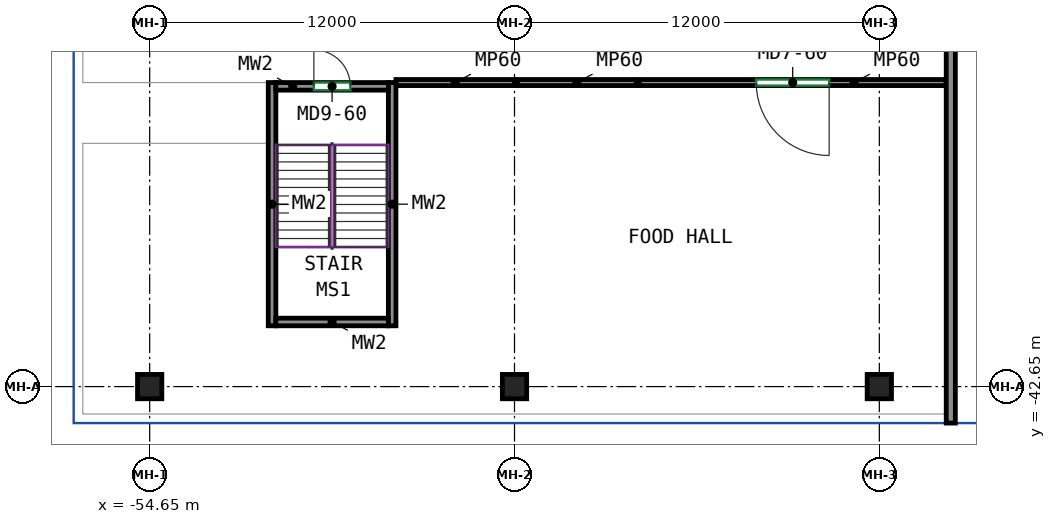
"""IFC4 building model, lengths in metres.
Left out: names, types, materials, properties, quantities, classifications, styles, units other than length and angle.
Written with IfcOpenShell. Run it as: python <this file> out.ifc"""

import sys

from ifc_helpers import new_model, si_unit, direction, frame, frame_2d, origin, origin_2d, place, context, subcontext, project, spatial, rectangle, extrude, source, transform, mapped, element, fill, save


model = new_model("IFC4")
c1 = context("Model", 3, precision=1e-05, world=origin(), true_north=direction((0.0, 1.0)))
c2 = subcontext(c1, "Body", "Model", "MODEL_VIEW")
j1 = project(units=[si_unit("LENGTHUNIT", "METRE"), si_unit("PLANEANGLEUNIT", "RADIAN")], contexts=[c1])
p1 = place(None, origin())
s1 = spatial("IfcSite", under=j1, at=p1, CompositionType="ELEMENT")
p2 = place(p1, origin())
s2 = spatial("IfcBuilding", under=s1, at=p2, CompositionType="ELEMENT")
p3 = place(p2, frame((0.0, 0.0, 9.0)))
s3 = spatial("IfcBuildingStorey", under=s2, at=p3, CompositionType="ELEMENT", Elevation=9.0)
m1 = source(origin(), c2, "Body", "SweptSolid", [
    extrude(rectangle(XDim=0.8, YDim=0.8, at=origin_2d()), origin(), (0.0, 0.0, 1.0), 4.1),
])
for number, where, z_axis, x_axis in (
    (1, (-54.65, -42.65, 0.0), (0.0, 0.0, 1.0), (1.0, 0.0, 0.0)),
    (2, (-42.65, -42.65, 0.0), (0.0, 0.0, 1.0), (1.0, 0.0, 0.0)),
    (3, (-30.65, -42.65, 0.0), (0.0, 0.0, 1.0), (1.0, 0.0, 0.0)),
):
    element("IfcColumn", number, at=place(p3, frame(where, z_axis=z_axis, x_axis=x_axis)), inside=s3, PredefinedType="COLUMN", context=c2, shape_type="MappedRepresentation", body=[
        mapped(m1, transform((0.0, 0.0, 0.0))),
    ])
m2 = source(origin(), c2, "Body", "SweptSolid", [
    extrude(rectangle(XDim=8.0, YDim=0.25, at=frame_2d((4.0, 0.0))), origin(), (0.0, 0.0, 1.0), 4.1),
])
for number, where, z_axis, x_axis in (
    (4, (-50.625, -40.65, 0.0), (0.0, 0.0, 1.0), (0.0, 1.0, 0.0)),
    (5, (-46.675, -40.65, 0.0), (0.0, 0.0, 1.0), (0.0, 1.0, 0.0)),
):
    element("IfcWall", number, at=place(p3, frame(where, z_axis=z_axis, x_axis=x_axis)), inside=s3, PredefinedType="SHEAR", context=c2, shape_type="MappedRepresentation", body=[
        mapped(m2, transform((0.0, 0.0, 0.0))),
    ])
m3 = source(origin(), c2, "Body", "SweptSolid", [
    extrude(rectangle(XDim=3.7, YDim=0.25, at=frame_2d((1.85, 0.0))), origin(), (0.0, 0.0, 1.0), 4.1),
])
p4 = place(p3, frame((-50.5, -40.525, 0.0), z_axis=(0.0, 0.0, 1.0), x_axis=(1.0, 0.0, 0.0)))
e6 = element("IfcWall", 6, at=p4, inside=s3, PredefinedType="SHEAR", context=c2, shape_type="MappedRepresentation", body=[
    mapped(m3, transform((0.0, 0.0, 0.0))),
])
p5 = place(p3, frame((-50.5, -32.775, 0.0), z_axis=(0.0, 0.0, 1.0), x_axis=(1.0, 0.0, 0.0)))
e7 = element("IfcWall", 7, at=p5, inside=s3, PredefinedType="SHEAR", context=c2, shape_type="MappedRepresentation", body=[
    mapped(m3, transform((0.0, 0.0, 0.0))),
])
p6 = place(p5, frame((1.25, 0.0, 0.0)))
e8 = element("IfcOpeningElement", 8, at=p6, cuts=e7, PredefinedType="OPENING", context=c2, shape_type="SweptSolid", body=[
    extrude(rectangle(XDim=1.2, YDim=2.1, at=frame_2d((0.6, 1.05))), frame((0.0, 0.135, 0.0), z_axis=(0.0, -1.0, 0.0), x_axis=(1.0, 0.0, 0.0)), (0.0, 0.0, 1.0), 0.27),
])
m4 = source(origin(), c2, "Body", "SweptSolid", [
    extrude(rectangle(XDim=100.7, YDim=0.3, at=frame_2d((50.35, 0.0))), origin(), (0.0, 0.0, 1.0), 4.1),
])
p7 = place(p3, frame((-57.0, -43.55, 0.0), z_axis=(0.0, 0.0, 1.0), x_axis=(0.0, 1.0, 0.0)))
e9 = element("IfcWall", 9, at=p7, inside=s3, PredefinedType="SOLIDWALL", context=c2, shape_type="MappedRepresentation", body=[
    mapped(m4, transform((0.0, 0.0, 0.0))),
])
p8 = place(p7, frame((3.15, 0.0, 0.9)))
e10 = element("IfcOpeningElement", 10, at=p8, cuts=e9, PredefinedType="OPENING", context=c2, shape_type="SweptSolid", body=[
    extrude(rectangle(XDim=2.4, YDim=1.8, at=frame_2d((1.2, 0.9))), frame((0.0, 0.16, 0.0), z_axis=(0.0, -1.0, 0.0), x_axis=(1.0, 0.0, 0.0)), (0.0, 0.0, 1.0), 0.32),
])
p9 = place(p7, frame((7.15, 0.0, 0.9)))
e11 = element("IfcOpeningElement", 11, at=p9, cuts=e9, PredefinedType="OPENING", context=c2, shape_type="SweptSolid", body=[
    extrude(rectangle(XDim=2.4, YDim=1.8, at=frame_2d((1.2, 0.9))), frame((0.0, 0.16, 0.0), z_axis=(0.0, -1.0, 0.0), x_axis=(1.0, 0.0, 0.0)), (0.0, 0.0, 1.0), 0.32),
])
p10 = place(p7, frame((11.15, 0.0, 0.9)))
e12 = element("IfcOpeningElement", 12, at=p10, cuts=e9, PredefinedType="OPENING", context=c2, shape_type="SweptSolid", body=[
    extrude(rectangle(XDim=2.4, YDim=1.8, at=frame_2d((1.2, 0.9))), frame((0.0, 0.16, 0.0), z_axis=(0.0, -1.0, 0.0), x_axis=(1.0, 0.0, 0.0)), (0.0, 0.0, 1.0), 0.32),
])
p11 = place(p7, frame((19.15, 0.0, 0.9)))
e13 = element("IfcOpeningElement", 13, at=p11, cuts=e9, PredefinedType="OPENING", context=c2, shape_type="SweptSolid", body=[
    extrude(rectangle(XDim=2.4, YDim=1.8, at=frame_2d((1.2, 0.9))), frame((0.0, 0.16, 0.0), z_axis=(0.0, -1.0, 0.0), x_axis=(1.0, 0.0, 0.0)), (0.0, 0.0, 1.0), 0.32),
])
p12 = place(p7, frame((23.15, 0.0, 0.9)))
e14 = element("IfcOpeningElement", 14, at=p12, cuts=e9, PredefinedType="OPENING", context=c2, shape_type="SweptSolid", body=[
    extrude(rectangle(XDim=2.4, YDim=1.8, at=frame_2d((1.2, 0.9))), frame((0.0, 0.16, 0.0), z_axis=(0.0, -1.0, 0.0), x_axis=(1.0, 0.0, 0.0)), (0.0, 0.0, 1.0), 0.32),
])
p13 = place(p7, frame((27.15, 0.0, 0.9)))
e15 = element("IfcOpeningElement", 15, at=p13, cuts=e9, PredefinedType="OPENING", context=c2, shape_type="SweptSolid", body=[
    extrude(rectangle(XDim=2.4, YDim=1.8, at=frame_2d((1.2, 0.9))), frame((0.0, 0.16, 0.0), z_axis=(0.0, -1.0, 0.0), x_axis=(1.0, 0.0, 0.0)), (0.0, 0.0, 1.0), 0.32),
])
p14 = place(p7, frame((31.15, 0.0, 0.9)))
e16 = element("IfcOpeningElement", 16, at=p14, cuts=e9, PredefinedType="OPENING", context=c2, shape_type="SweptSolid", body=[
    extrude(rectangle(XDim=2.4, YDim=1.8, at=frame_2d((1.2, 0.9))), frame((0.0, 0.16, 0.0), z_axis=(0.0, -1.0, 0.0), x_axis=(1.0, 0.0, 0.0)), (0.0, 0.0, 1.0), 0.32),
])
p15 = place(p7, frame((39.15, 0.0, 0.9)))
e17 = element("IfcOpeningElement", 17, at=p15, cuts=e9, PredefinedType="OPENING", context=c2, shape_type="SweptSolid", body=[
    extrude(rectangle(XDim=2.4, YDim=1.8, at=frame_2d((1.2, 0.9))), frame((0.0, 0.16, 0.0), z_axis=(0.0, -1.0, 0.0), x_axis=(1.0, 0.0, 0.0)), (0.0, 0.0, 1.0), 0.32),
])
p16 = place(p7, frame((43.15, 0.0, 0.9)))
e18 = element("IfcOpeningElement", 18, at=p16, cuts=e9, PredefinedType="OPENING", context=c2, shape_type="SweptSolid", body=[
    extrude(rectangle(XDim=2.4, YDim=1.8, at=frame_2d((1.2, 0.9))), frame((0.0, 0.16, 0.0), z_axis=(0.0, -1.0, 0.0), x_axis=(1.0, 0.0, 0.0)), (0.0, 0.0, 1.0), 0.32),
])
p17 = place(p7, frame((51.15, 0.0, 0.9)))
e19 = element("IfcOpeningElement", 19, at=p17, cuts=e9, PredefinedType="OPENING", context=c2, shape_type="SweptSolid", body=[
    extrude(rectangle(XDim=2.4, YDim=1.8, at=frame_2d((1.2, 0.9))), frame((0.0, 0.16, 0.0), z_axis=(0.0, -1.0, 0.0), x_axis=(1.0, 0.0, 0.0)), (0.0, 0.0, 1.0), 0.32),
])
p18 = place(p7, frame((55.15, 0.0, 0.9)))
e20 = element("IfcOpeningElement", 20, at=p18, cuts=e9, PredefinedType="OPENING", context=c2, shape_type="SweptSolid", body=[
    extrude(rectangle(XDim=2.4, YDim=1.8, at=frame_2d((1.2, 0.9))), frame((0.0, 0.16, 0.0), z_axis=(0.0, -1.0, 0.0), x_axis=(1.0, 0.0, 0.0)), (0.0, 0.0, 1.0), 0.32),
])
p19 = place(p7, frame((59.15, 0.0, 0.9)))
e21 = element("IfcOpeningElement", 21, at=p19, cuts=e9, PredefinedType="OPENING", context=c2, shape_type="SweptSolid", body=[
    extrude(rectangle(XDim=2.4, YDim=1.8, at=frame_2d((1.2, 0.9))), frame((0.0, 0.16, 0.0), z_axis=(0.0, -1.0, 0.0), x_axis=(1.0, 0.0, 0.0)), (0.0, 0.0, 1.0), 0.32),
])
p20 = place(p7, frame((63.15, 0.0, 0.9)))
e22 = element("IfcOpeningElement", 22, at=p20, cuts=e9, PredefinedType="OPENING", context=c2, shape_type="SweptSolid", body=[
    extrude(rectangle(XDim=2.4, YDim=1.8, at=frame_2d((1.2, 0.9))), frame((0.0, 0.16, 0.0), z_axis=(0.0, -1.0, 0.0), x_axis=(1.0, 0.0, 0.0)), (0.0, 0.0, 1.0), 0.32),
])
p21 = place(p7, frame((67.15, 0.0, 0.9)))
e23 = element("IfcOpeningElement", 23, at=p21, cuts=e9, PredefinedType="OPENING", context=c2, shape_type="SweptSolid", body=[
    extrude(rectangle(XDim=2.4, YDim=1.8, at=frame_2d((1.2, 0.9))), frame((0.0, 0.16, 0.0), z_axis=(0.0, -1.0, 0.0), x_axis=(1.0, 0.0, 0.0)), (0.0, 0.0, 1.0), 0.32),
])
p22 = place(p7, frame((75.15, 0.0, 0.9)))
e24 = element("IfcOpeningElement", 24, at=p22, cuts=e9, PredefinedType="OPENING", context=c2, shape_type="SweptSolid", body=[
    extrude(rectangle(XDim=2.4, YDim=1.8, at=frame_2d((1.2, 0.9))), frame((0.0, 0.16, 0.0), z_axis=(0.0, -1.0, 0.0), x_axis=(1.0, 0.0, 0.0)), (0.0, 0.0, 1.0), 0.32),
])
p23 = place(p7, frame((79.15, 0.0, 0.9)))
e25 = element("IfcOpeningElement", 25, at=p23, cuts=e9, PredefinedType="OPENING", context=c2, shape_type="SweptSolid", body=[
    extrude(rectangle(XDim=2.4, YDim=1.8, at=frame_2d((1.2, 0.9))), frame((0.0, 0.16, 0.0), z_axis=(0.0, -1.0, 0.0), x_axis=(1.0, 0.0, 0.0)), (0.0, 0.0, 1.0), 0.32),
])
p24 = place(p7, frame((83.15, 0.0, 0.9)))
e26 = element("IfcOpeningElement", 26, at=p24, cuts=e9, PredefinedType="OPENING", context=c2, shape_type="SweptSolid", body=[
    extrude(rectangle(XDim=2.4, YDim=1.8, at=frame_2d((1.2, 0.9))), frame((0.0, 0.16, 0.0), z_axis=(0.0, -1.0, 0.0), x_axis=(1.0, 0.0, 0.0)), (0.0, 0.0, 1.0), 0.32),
])
p25 = place(p7, frame((87.15, 0.0, 0.9)))
e27 = element("IfcOpeningElement", 27, at=p25, cuts=e9, PredefinedType="OPENING", context=c2, shape_type="SweptSolid", body=[
    extrude(rectangle(XDim=2.4, YDim=1.8, at=frame_2d((1.2, 0.9))), frame((0.0, 0.16, 0.0), z_axis=(0.0, -1.0, 0.0), x_axis=(1.0, 0.0, 0.0)), (0.0, 0.0, 1.0), 0.32),
])
p26 = place(p7, frame((91.15, 0.0, 0.9)))
e28 = element("IfcOpeningElement", 28, at=p26, cuts=e9, PredefinedType="OPENING", context=c2, shape_type="SweptSolid", body=[
    extrude(rectangle(XDim=2.4, YDim=1.8, at=frame_2d((1.2, 0.9))), frame((0.0, 0.16, 0.0), z_axis=(0.0, -1.0, 0.0), x_axis=(1.0, 0.0, 0.0)), (0.0, 0.0, 1.0), 0.32),
])
p27 = place(p7, frame((95.15, 0.0, 0.9)))
e29 = element("IfcOpeningElement", 29, at=p27, cuts=e9, PredefinedType="OPENING", context=c2, shape_type="SweptSolid", body=[
    extrude(rectangle(XDim=2.4, YDim=1.8, at=frame_2d((1.2, 0.9))), frame((0.0, 0.16, 0.0), z_axis=(0.0, -1.0, 0.0), x_axis=(1.0, 0.0, 0.0)), (0.0, 0.0, 1.0), 0.32),
])
m5 = source(origin(), c2, "Body", "SweptSolid", [
    extrude(rectangle(XDim=72.0, YDim=0.3, at=frame_2d((36.0, 0.0))), origin(), (0.0, 0.0, 1.0), 4.1),
])
p28 = place(p3, frame((-28.3, 28.15, 0.0), z_axis=(0.0, 0.0, 1.0), x_axis=(0.0, -1.0, 0.0)))
e30 = element("IfcWall", 30, at=p28, inside=s3, PredefinedType="SOLIDWALL", context=c2, shape_type="MappedRepresentation", body=[
    mapped(m5, transform((0.0, 0.0, 0.0))),
])
m6 = source(origin(), c2, "Body", "SweptSolid", [
    extrude(rectangle(XDim=28.7, YDim=0.3, at=frame_2d((14.35, 0.0))), origin(), (0.0, 0.0, 1.0), 4.1),
])
p29 = place(p3, frame((-28.45, -43.7, 0.0), z_axis=(0.0, 0.0, 1.0), x_axis=(-1.0, 0.0, 0.0)))
e31 = element("IfcWall", 31, at=p29, inside=s3, PredefinedType="SOLIDWALL", context=c2, shape_type="MappedRepresentation", body=[
    mapped(m6, transform((0.0, 0.0, 0.0))),
])
p30 = place(p29, frame((3.15, 0.0, 0.9)))
e32 = element("IfcOpeningElement", 32, at=p30, cuts=e31, PredefinedType="OPENING", context=c2, shape_type="SweptSolid", body=[
    extrude(rectangle(XDim=2.4, YDim=1.8, at=frame_2d((1.2, 0.9))), frame((0.0, 0.16, 0.0), z_axis=(0.0, -1.0, 0.0), x_axis=(1.0, 0.0, 0.0)), (0.0, 0.0, 1.0), 0.32),
])
p31 = place(p29, frame((7.15, 0.0, 0.9)))
e33 = element("IfcOpeningElement", 33, at=p31, cuts=e31, PredefinedType="OPENING", context=c2, shape_type="SweptSolid", body=[
    extrude(rectangle(XDim=2.4, YDim=1.8, at=frame_2d((1.2, 0.9))), frame((0.0, 0.16, 0.0), z_axis=(0.0, -1.0, 0.0), x_axis=(1.0, 0.0, 0.0)), (0.0, 0.0, 1.0), 0.32),
])
p32 = place(p29, frame((11.15, 0.0, 0.9)))
e34 = element("IfcOpeningElement", 34, at=p32, cuts=e31, PredefinedType="OPENING", context=c2, shape_type="SweptSolid", body=[
    extrude(rectangle(XDim=2.4, YDim=1.8, at=frame_2d((1.2, 0.9))), frame((0.0, 0.16, 0.0), z_axis=(0.0, -1.0, 0.0), x_axis=(1.0, 0.0, 0.0)), (0.0, 0.0, 1.0), 0.32),
])
p33 = place(p29, frame((15.15, 0.0, 0.9)))
e35 = element("IfcOpeningElement", 35, at=p33, cuts=e31, PredefinedType="OPENING", context=c2, shape_type="SweptSolid", body=[
    extrude(rectangle(XDim=2.4, YDim=1.8, at=frame_2d((1.2, 0.9))), frame((0.0, 0.16, 0.0), z_axis=(0.0, -1.0, 0.0), x_axis=(1.0, 0.0, 0.0)), (0.0, 0.0, 1.0), 0.32),
])
p34 = place(p29, frame((19.15, 0.0, 0.9)))
e36 = element("IfcOpeningElement", 36, at=p34, cuts=e31, PredefinedType="OPENING", context=c2, shape_type="SweptSolid", body=[
    extrude(rectangle(XDim=2.4, YDim=1.8, at=frame_2d((1.2, 0.9))), frame((0.0, 0.16, 0.0), z_axis=(0.0, -1.0, 0.0), x_axis=(1.0, 0.0, 0.0)), (0.0, 0.0, 1.0), 0.32),
])
p35 = place(p29, frame((23.15, 0.0, 0.9)))
e37 = element("IfcOpeningElement", 37, at=p35, cuts=e31, PredefinedType="OPENING", context=c2, shape_type="SweptSolid", body=[
    extrude(rectangle(XDim=2.4, YDim=1.8, at=frame_2d((1.2, 0.9))), frame((0.0, 0.16, 0.0), z_axis=(0.0, -1.0, 0.0), x_axis=(1.0, 0.0, 0.0)), (0.0, 0.0, 1.0), 0.32),
])
m7 = source(origin(), c2, "Body", "SweptSolid", [
    extrude(rectangle(XDim=3.9, YDim=0.2, at=frame_2d((1.95, 0.0))), origin(), (0.0, 0.0, 1.0), 3.2),
])
for number, where, z_axis, x_axis in (
    (38, (-42.65, -32.65, 0.0), (0.0, 0.0, 1.0), (-1.0, 0.0, 0.0)),
    (39, (-38.65, -32.65, 0.0), (0.0, 0.0, 1.0), (-1.0, 0.0, 0.0)),
):
    element("IfcWall", number, at=place(p3, frame(where, z_axis=z_axis, x_axis=x_axis)), inside=s3, PredefinedType="PARTITIONING", context=c2, shape_type="MappedRepresentation", body=[
        mapped(m7, transform((0.0, 0.0, 0.0))),
    ])
m8 = source(origin(), c2, "Body", "SweptSolid", [
    extrude(rectangle(XDim=10.1, YDim=0.2, at=frame_2d((5.05, 0.0))), origin(), (0.0, 0.0, 1.0), 3.2),
])
p36 = place(p3, frame((-28.45, -32.65, 0.0), z_axis=(0.0, 0.0, 1.0), x_axis=(-1.0, 0.0, 0.0)))
e40 = element("IfcWall", 40, at=p36, inside=s3, PredefinedType="PARTITIONING", context=c2, shape_type="MappedRepresentation", body=[
    mapped(m8, transform((0.0, 0.0, 0.0))),
])
p37 = place(p36, frame((3.85, 0.0, 0.0)))
e41 = element("IfcOpeningElement", 41, at=p37, cuts=e40, PredefinedType="OPENING", context=c2, shape_type="SweptSolid", body=[
    extrude(rectangle(XDim=2.4, YDim=2.4, at=frame_2d((1.2, 1.2))), frame((0.0, 0.11, 0.0), z_axis=(0.0, -1.0, 0.0), x_axis=(1.0, 0.0, 0.0)), (0.0, 0.0, 1.0), 0.22),
])
p38 = place(p8, origin())
e42 = element("IfcWindow", 42, at=p38, inside=s3, PartitioningType="SINGLE_PANEL", PredefinedType="WINDOW", context=c2, shape_type="SweptSolid", body=[
    extrude(rectangle(XDim=2.4, YDim=1.8, at=frame_2d((1.2, 0.9))), frame((0.0, 0.03, 0.0), z_axis=(0.0, -1.0, 0.0), x_axis=(1.0, 0.0, 0.0)), (0.0, 0.0, 1.0), 0.06),
])
fill(e10, e42)
p39 = place(p9, origin())
e43 = element("IfcWindow", 43, at=p39, inside=s3, PartitioningType="SINGLE_PANEL", PredefinedType="WINDOW", context=c2, shape_type="SweptSolid", body=[
    extrude(rectangle(XDim=2.4, YDim=1.8, at=frame_2d((1.2, 0.9))), frame((0.0, 0.03, 0.0), z_axis=(0.0, -1.0, 0.0), x_axis=(1.0, 0.0, 0.0)), (0.0, 0.0, 1.0), 0.06),
])
fill(e11, e43)
p40 = place(p10, origin())
e44 = element("IfcWindow", 44, at=p40, inside=s3, PartitioningType="SINGLE_PANEL", PredefinedType="WINDOW", context=c2, shape_type="SweptSolid", body=[
    extrude(rectangle(XDim=2.4, YDim=1.8, at=frame_2d((1.2, 0.9))), frame((0.0, 0.03, 0.0), z_axis=(0.0, -1.0, 0.0), x_axis=(1.0, 0.0, 0.0)), (0.0, 0.0, 1.0), 0.06),
])
fill(e12, e44)
p41 = place(p30, origin())
e45 = element("IfcWindow", 45, at=p41, inside=s3, PartitioningType="SINGLE_PANEL", PredefinedType="WINDOW", context=c2, shape_type="SweptSolid", body=[
    extrude(rectangle(XDim=2.4, YDim=1.8, at=frame_2d((1.2, 0.9))), frame((0.0, 0.03, 0.0), z_axis=(0.0, -1.0, 0.0), x_axis=(1.0, 0.0, 0.0)), (0.0, 0.0, 1.0), 0.06),
])
fill(e32, e45)
p42 = place(p31, origin())
e46 = element("IfcWindow", 46, at=p42, inside=s3, PartitioningType="SINGLE_PANEL", PredefinedType="WINDOW", context=c2, shape_type="SweptSolid", body=[
    extrude(rectangle(XDim=2.4, YDim=1.8, at=frame_2d((1.2, 0.9))), frame((0.0, 0.03, 0.0), z_axis=(0.0, -1.0, 0.0), x_axis=(1.0, 0.0, 0.0)), (0.0, 0.0, 1.0), 0.06),
])
fill(e33, e46)
p43 = place(p32, origin())
e47 = element("IfcWindow", 47, at=p43, inside=s3, PartitioningType="SINGLE_PANEL", PredefinedType="WINDOW", context=c2, shape_type="SweptSolid", body=[
    extrude(rectangle(XDim=2.4, YDim=1.8, at=frame_2d((1.2, 0.9))), frame((0.0, 0.03, 0.0), z_axis=(0.0, -1.0, 0.0), x_axis=(1.0, 0.0, 0.0)), (0.0, 0.0, 1.0), 0.06),
])
fill(e34, e47)
p44 = place(p33, origin())
e48 = element("IfcWindow", 48, at=p44, inside=s3, PartitioningType="SINGLE_PANEL", PredefinedType="WINDOW", context=c2, shape_type="SweptSolid", body=[
    extrude(rectangle(XDim=2.4, YDim=1.8, at=frame_2d((1.2, 0.9))), frame((0.0, 0.03, 0.0), z_axis=(0.0, -1.0, 0.0), x_axis=(1.0, 0.0, 0.0)), (0.0, 0.0, 1.0), 0.06),
])
fill(e35, e48)
p45 = place(p34, origin())
e49 = element("IfcWindow", 49, at=p45, inside=s3, PartitioningType="SINGLE_PANEL", PredefinedType="WINDOW", context=c2, shape_type="SweptSolid", body=[
    extrude(rectangle(XDim=2.4, YDim=1.8, at=frame_2d((1.2, 0.9))), frame((0.0, 0.03, 0.0), z_axis=(0.0, -1.0, 0.0), x_axis=(1.0, 0.0, 0.0)), (0.0, 0.0, 1.0), 0.06),
])
fill(e36, e49)
p46 = place(p35, origin())
e50 = element("IfcWindow", 50, at=p46, inside=s3, PartitioningType="SINGLE_PANEL", PredefinedType="WINDOW", context=c2, shape_type="SweptSolid", body=[
    extrude(rectangle(XDim=2.4, YDim=1.8, at=frame_2d((1.2, 0.9))), frame((0.0, 0.03, 0.0), z_axis=(0.0, -1.0, 0.0), x_axis=(1.0, 0.0, 0.0)), (0.0, 0.0, 1.0), 0.06),
])
fill(e37, e50)
p47 = place(p6, origin())
e51 = element("IfcDoor", 51, at=p47, inside=s3, OperationType="DOUBLE_DOOR_SINGLE_SWING", PredefinedType="DOOR", context=c2, shape_type="SweptSolid", body=[
    extrude(rectangle(XDim=1.2, YDim=2.1, at=frame_2d((0.6, 1.05))), frame((0.0, 0.025, 0.0), z_axis=(0.0, -1.0, 0.0), x_axis=(1.0, 0.0, 0.0)), (0.0, 0.0, 1.0), 0.05),
])
fill(e8, e51)
p48 = place(p37, origin())
e52 = element("IfcDoor", 52, at=p48, inside=s3, OperationType="DOUBLE_DOOR_SINGLE_SWING", PredefinedType="DOOR", context=c2, shape_type="SweptSolid", body=[
    extrude(rectangle(XDim=2.4, YDim=2.4, at=frame_2d((1.2, 1.2))), frame((0.0, 0.025, 0.0), z_axis=(0.0, -1.0, 0.0), x_axis=(1.0, 0.0, 0.0)), (0.0, 0.0, 1.0), 0.05),
])
fill(e41, e52)
save(model, sys.argv[1])
